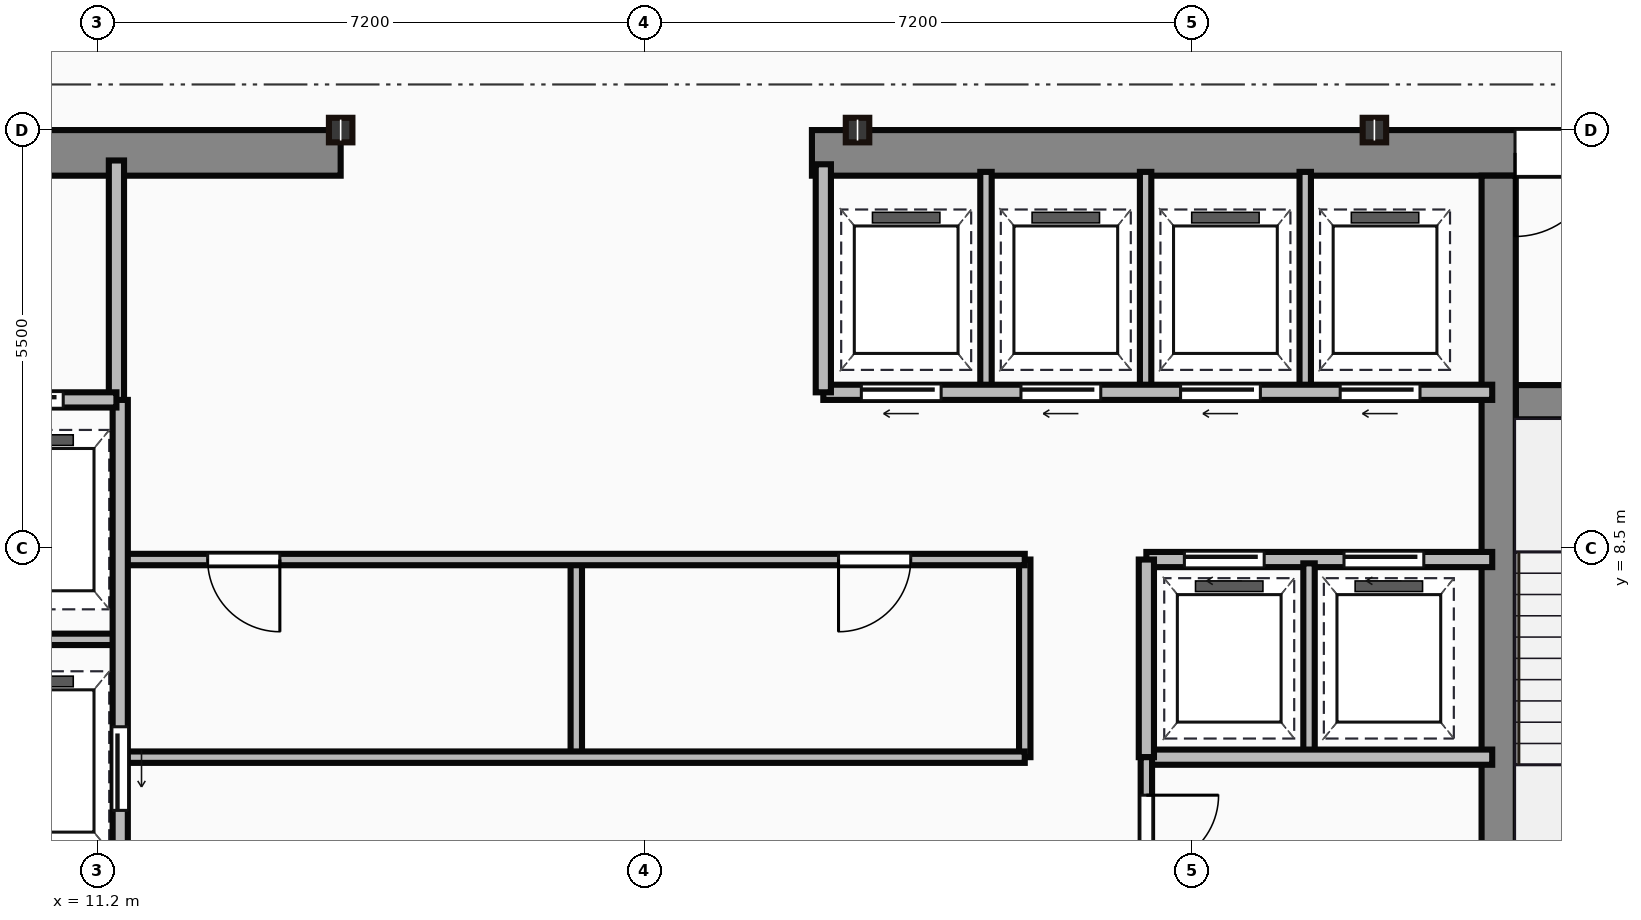
"""IFC4 building model, lengths in metres.
Left out: names, types, materials, properties, quantities, classifications, styles, units other than length and angle.
Written with IfcOpenShell. Run it as: python <this file> out.ifc"""

import sys

from ifc_helpers import new_model, si_unit, direction, frame, frame_2d, origin, origin_2d, place, context, subcontext, project, spatial, rectangle, i_section, extrude, source, transform, mapped, element, fill, save


model = new_model("IFC4")
c1 = context("Model", 3, precision=1e-05, world=origin(), true_north=direction((0.0, 1.0)))
c2 = subcontext(c1, "Body", "Model", "MODEL_VIEW")
j1 = project(units=[si_unit("LENGTHUNIT", "METRE"), si_unit("PLANEANGLEUNIT", "RADIAN")], contexts=[c1])
p1 = place(None, origin())
s1 = spatial("IfcSite", under=j1, at=p1, CompositionType="ELEMENT")
p2 = place(p1, origin())
s2 = spatial("IfcBuilding", under=s1, at=p2, CompositionType="ELEMENT")
p3 = place(p2, frame((0.0, 0.0, 280.7)))
s3 = spatial("IfcBuildingStorey", under=s2, at=p3, CompositionType="ELEMENT", Elevation=280.7)
m1 = source(origin(), c2, "Body", "SweptSolid", [
    extrude(rectangle(XDim=9.1, YDim=0.6, at=frame_2d((4.55, 0.0))), origin(), (0.0, 0.0, 1.0), 3.65),
])
p4 = place(p3, frame((5.3, 13.7, 0.0), z_axis=(0.0, 0.0, 1.0), x_axis=(1.0, 0.0, 0.0)))
e1 = element("IfcWall", 1, at=p4, inside=s3, PredefinedType="SHEAR", context=c2, shape_type="MappedRepresentation", body=[
    mapped(m1, transform((0.0, 0.0, 0.0))),
])
p5 = place(p4, frame((4.1, 0.0, 0.0)))
e2 = element("IfcOpeningElement", 2, at=p5, cuts=e1, PredefinedType="OPENING", context=c2, shape_type="SweptSolid", body=[
    extrude(rectangle(XDim=1.1, YDim=2.15, at=frame_2d((0.55, 1.075))), frame((0.0, 0.31, 0.0), z_axis=(0.0, -1.0, 0.0), x_axis=(1.0, 0.0, 0.0)), (0.0, 0.0, 1.0), 0.62),
])
m2 = source(origin(), c2, "Body", "SweptSolid", [
    extrude(rectangle(XDim=12.6, YDim=0.6, at=frame_2d((6.3, 0.0))), origin(), (0.0, 0.0, 1.0), 3.65),
])
p6 = place(p3, frame((20.6, 13.7, 0.0), z_axis=(0.0, 0.0, 1.0), x_axis=(1.0, 0.0, 0.0)))
e3 = element("IfcWall", 3, at=p6, inside=s3, PredefinedType="SHEAR", context=c2, shape_type="MappedRepresentation", body=[
    mapped(m2, transform((0.0, 0.0, 0.0))),
])
p7 = place(p6, frame((9.25, 0.0, 0.0)))
e4 = element("IfcOpeningElement", 4, at=p7, cuts=e3, PredefinedType="OPENING", context=c2, shape_type="SweptSolid", body=[
    extrude(rectangle(XDim=1.1, YDim=2.15, at=frame_2d((0.55, 1.075))), frame((0.0, 0.31, 0.0), z_axis=(0.0, -1.0, 0.0), x_axis=(1.0, 0.0, 0.0)), (0.0, 0.0, 1.0), 0.62),
])
m3 = source(origin(), c2, "Body", "SweptSolid", [
    extrude(rectangle(XDim=12.5, YDim=0.45, at=frame_2d((6.25, 0.0))), origin(), (0.0, 0.0, 1.0), 3.65),
])
p8 = place(p3, frame((29.635, 0.9, 0.0), z_axis=(0.0, 0.0, 1.0), x_axis=(0.0, 1.0, 0.0)))
e5 = element("IfcWall", 5, at=p8, inside=s3, PredefinedType="SHEAR", context=c2, shape_type="MappedRepresentation", body=[
    mapped(m3, transform((0.0, 0.0, 0.0))),
])
m4 = source(origin(), c2, "Body", "SweptSolid", [
    extrude(rectangle(XDim=3.39, YDim=0.45, at=frame_2d((1.695, 0.0))), origin(), (0.0, 0.0, 1.0), 3.65),
])
p9 = place(p3, frame((29.86, 10.42, 0.0), z_axis=(0.0, 0.0, 1.0), x_axis=(1.0, 0.0, 0.0)))
e6 = element("IfcWall", 6, at=p9, inside=s3, PredefinedType="SHEAR", context=c2, shape_type="MappedRepresentation", body=[
    mapped(m4, transform((0.0, 0.0, 0.0))),
])
p10 = place(p9, frame((1.1, 0.0, 0.0)))
e7 = element("IfcOpeningElement", 7, at=p10, cuts=e6, PredefinedType="OPENING", context=c2, shape_type="SweptSolid", body=[
    extrude(rectangle(XDim=1.1, YDim=2.15, at=frame_2d((0.55, 1.075))), frame((0.0, 0.235, 0.0), z_axis=(0.0, -1.0, 0.0), x_axis=(1.0, 0.0, 0.0)), (0.0, 0.0, 1.0), 0.47),
])
m5 = source(origin(), c2, "Body", "SweptSolid", [
    extrude(i_section(OverallWidth=0.309, OverallDepth=0.323, WebThickness=0.014, FlangeThickness=0.023, at=origin_2d()), origin(), (0.0, 0.0, 1.0), 3.65),
])
for number, where, z_axis, x_axis in (
    (8, (14.4, 14.0, 0.0), (0.0, 0.0, 1.0), (1.0, 0.0, 0.0)),
    (9, (21.2, 14.0, 0.0), (0.0, 0.0, 1.0), (1.0, 0.0, 0.0)),
    (10, (28.0, 14.0, 0.0), (0.0, 0.0, 1.0), (1.0, 0.0, 0.0)),
):
    element("IfcColumn", number, at=place(p3, frame(where, z_axis=z_axis, x_axis=x_axis)), inside=s3, PredefinedType="COLUMN", context=c2, shape_type="MappedRepresentation", body=[
        mapped(m5, transform((0.0, 0.0, 0.0))),
    ])
m6 = source(origin(), c2, "Body", "SweptSolid", [
    extrude(rectangle(XDim=3.18, YDim=0.2, at=frame_2d((1.59, 0.0))), origin(), (0.0, 0.0, 1.0), 3.4),
])
p11 = place(p3, frame((11.45, 10.42, 0.0), z_axis=(0.0, 0.0, 1.0), x_axis=(0.0, 1.0, 0.0)))
e11 = element("IfcWall", 11, at=p11, inside=s3, PredefinedType="PARTITIONING", context=c2, shape_type="MappedRepresentation", body=[
    mapped(m6, transform((0.0, 0.0, 0.0))),
])
m7 = source(origin(), c2, "Body", "SweptSolid", [
    extrude(rectangle(XDim=2.35, YDim=0.2, at=frame_2d((1.175, 0.0))), origin(), (0.0, 0.0, 1.0), 3.4),
])
p12 = place(p3, frame((9.1, 10.45, 0.0), z_axis=(0.0, 0.0, 1.0), x_axis=(1.0, 0.0, 0.0)))
e12 = element("IfcWall", 12, at=p12, inside=s3, PredefinedType="PARTITIONING", context=c2, shape_type="MappedRepresentation", body=[
    mapped(m7, transform((0.0, 0.0, 0.0))),
])
p13 = place(p12, frame((0.55, 0.0, 0.0)))
e13 = element("IfcOpeningElement", 13, at=p13, cuts=e12, PredefinedType="OPENING", context=c2, shape_type="SweptSolid", body=[
    extrude(rectangle(XDim=1.1, YDim=2.15, at=frame_2d((0.55, 1.075))), frame((0.0, 0.11, 0.0), z_axis=(0.0, -1.0, 0.0), x_axis=(1.0, 0.0, 0.0)), (0.0, 0.0, 1.0), 0.22),
])
m8 = source(origin(), c2, "Body", "SweptSolid", [
    extrude(rectangle(XDim=9.6, YDim=0.2, at=frame_2d((4.8, 0.0))), origin(), (0.0, 0.0, 1.0), 3.4),
])
p14 = place(p3, frame((11.5, 0.85, 0.0), z_axis=(0.0, 0.0, 1.0), x_axis=(0.0, 1.0, 0.0)))
e14 = element("IfcWall", 14, at=p14, inside=s3, PredefinedType="PARTITIONING", context=c2, shape_type="MappedRepresentation", body=[
    mapped(m8, transform((0.0, 0.0, 0.0))),
])
p15 = place(p14, frame((4.2, 0.0, 0.0)))
e15 = element("IfcOpeningElement", 15, at=p15, cuts=e14, PredefinedType="OPENING", context=c2, shape_type="SweptSolid", body=[
    extrude(rectangle(XDim=1.1, YDim=2.15, at=frame_2d((0.55, 1.075))), frame((0.0, 0.11, 0.0), z_axis=(0.0, -1.0, 0.0), x_axis=(1.0, 0.0, 0.0)), (0.0, 0.0, 1.0), 0.22),
])
p16 = place(p14, frame((0.9, 0.0, 0.0)))
e16 = element("IfcOpeningElement", 16, at=p16, cuts=e14, PredefinedType="OPENING", context=c2, shape_type="SweptSolid", body=[
    extrude(rectangle(XDim=1.2, YDim=2.15, at=frame_2d((0.6, 1.075))), frame((0.0, 0.11, 0.0), z_axis=(0.0, -1.0, 0.0), x_axis=(1.0, 0.0, 0.0)), (0.0, 0.0, 1.0), 0.22),
])
m9 = source(origin(), c2, "Body", "SweptSolid", [
    extrude(rectangle(XDim=2.4, YDim=0.15, at=frame_2d((1.2, 0.0))), origin(), (0.0, 0.0, 1.0), 3.4),
])
p17 = place(p3, frame((9.1, 7.3, 0.0), z_axis=(0.0, 0.0, 1.0), x_axis=(1.0, 0.0, 0.0)))
e17 = element("IfcWall", 17, at=p17, inside=s3, PredefinedType="PARTITIONING", context=c2, shape_type="MappedRepresentation", body=[
    mapped(m9, transform((0.0, 0.0, 0.0))),
])
m10 = source(origin(), c2, "Body", "SweptSolid", [
    extrude(rectangle(XDim=11.85, YDim=0.15, at=frame_2d((5.925, 0.0))), origin(), (0.0, 0.0, 1.0), 3.4),
])
p18 = place(p3, frame((11.55, 5.75, 0.0), z_axis=(0.0, 0.0, 1.0), x_axis=(1.0, 0.0, 0.0)))
e18 = element("IfcWall", 18, at=p18, inside=s3, PredefinedType="PARTITIONING", context=c2, shape_type="MappedRepresentation", body=[
    mapped(m10, transform((0.0, 0.0, 0.0))),
])
p19 = place(p3, frame((11.55, 8.35, 0.0), z_axis=(0.0, 0.0, 1.0), x_axis=(1.0, 0.0, 0.0)))
e19 = element("IfcWall", 19, at=p19, inside=s3, PredefinedType="PARTITIONING", context=c2, shape_type="MappedRepresentation", body=[
    mapped(m10, transform((0.0, 0.0, 0.0))),
])
p20 = place(p19, frame((1.1, 0.0, 0.0)))
e20 = element("IfcOpeningElement", 20, at=p20, cuts=e19, PredefinedType="OPENING", context=c2, shape_type="SweptSolid", body=[
    extrude(rectangle(XDim=0.95, YDim=2.15, at=frame_2d((0.475, 1.075))), frame((0.0, 0.085, 0.0), z_axis=(0.0, -1.0, 0.0), x_axis=(1.0, 0.0, 0.0)), (0.0, 0.0, 1.0), 0.17),
])
p21 = place(p19, frame((9.4, 0.0, 0.0)))
e21 = element("IfcOpeningElement", 21, at=p21, cuts=e19, PredefinedType="OPENING", context=c2, shape_type="SweptSolid", body=[
    extrude(rectangle(XDim=0.95, YDim=2.15, at=frame_2d((0.475, 1.075))), frame((0.0, 0.085, 0.0), z_axis=(0.0, -1.0, 0.0), x_axis=(1.0, 0.0, 0.0)), (0.0, 0.0, 1.0), 0.17),
])
m11 = source(origin(), c2, "Body", "SweptSolid", [
    extrude(rectangle(XDim=2.6, YDim=0.15, at=frame_2d((1.3, 0.0))), origin(), (0.0, 0.0, 1.0), 3.4),
])
p22 = place(p3, frame((23.4, 5.75, 0.0), z_axis=(0.0, 0.0, 1.0), x_axis=(0.0, 1.0, 0.0)))
e22 = element("IfcWall", 22, at=p22, inside=s3, PredefinedType="PARTITIONING", context=c2, shape_type="MappedRepresentation", body=[
    mapped(m11, transform((0.0, 0.0, 0.0))),
])
m12 = source(origin(), c2, "Body", "SweptSolid", [
    extrude(rectangle(XDim=2.5, YDim=0.15, at=frame_2d((1.25, 0.0))), origin(), (0.0, 0.0, 1.0), 3.4),
])
p23 = place(p3, frame((17.5, 5.8, 0.0), z_axis=(0.0, 0.0, 1.0), x_axis=(0.0, 1.0, 0.0)))
e23 = element("IfcWall", 23, at=p23, inside=s3, PredefinedType="PARTITIONING", context=c2, shape_type="MappedRepresentation", body=[
    mapped(m12, transform((0.0, 0.0, 0.0))),
])
m13 = source(origin(), c2, "Body", "SweptSolid", [
    extrude(rectangle(XDim=8.8, YDim=0.2, at=frame_2d((4.4, 0.0))), origin(), (0.0, 0.0, 1.0), 3.4),
])
p24 = place(p3, frame((20.75, 10.55, 0.0), z_axis=(0.0, 0.0, 1.0), x_axis=(1.0, 0.0, 0.0)))
e24 = element("IfcWall", 24, at=p24, inside=s3, PredefinedType="PARTITIONING", context=c2, shape_type="MappedRepresentation", body=[
    mapped(m13, transform((0.0, 0.0, 0.0))),
])
p25 = place(p24, frame((0.5, 0.0, 0.0)))
e25 = element("IfcOpeningElement", 25, at=p25, cuts=e24, PredefinedType="OPENING", context=c2, shape_type="SweptSolid", body=[
    extrude(rectangle(XDim=1.05, YDim=2.15, at=frame_2d((0.525, 1.075))), frame((0.0, 0.11, 0.0), z_axis=(0.0, -1.0, 0.0), x_axis=(1.0, 0.0, 0.0)), (0.0, 0.0, 1.0), 0.22),
])
p26 = place(p24, frame((2.6, 0.0, 0.0)))
e26 = element("IfcOpeningElement", 26, at=p26, cuts=e24, PredefinedType="OPENING", context=c2, shape_type="SweptSolid", body=[
    extrude(rectangle(XDim=1.05, YDim=2.15, at=frame_2d((0.525, 1.075))), frame((0.0, 0.11, 0.0), z_axis=(0.0, -1.0, 0.0), x_axis=(1.0, 0.0, 0.0)), (0.0, 0.0, 1.0), 0.22),
])
p27 = place(p24, frame((4.7, 0.0, 0.0)))
e27 = element("IfcOpeningElement", 27, at=p27, cuts=e24, PredefinedType="OPENING", context=c2, shape_type="SweptSolid", body=[
    extrude(rectangle(XDim=1.05, YDim=2.15, at=frame_2d((0.525, 1.075))), frame((0.0, 0.11, 0.0), z_axis=(0.0, -1.0, 0.0), x_axis=(1.0, 0.0, 0.0)), (0.0, 0.0, 1.0), 0.22),
])
p28 = place(p24, frame((6.8, 0.0, 0.0)))
e28 = element("IfcOpeningElement", 28, at=p28, cuts=e24, PredefinedType="OPENING", context=c2, shape_type="SweptSolid", body=[
    extrude(rectangle(XDim=1.05, YDim=2.15, at=frame_2d((0.525, 1.075))), frame((0.0, 0.11, 0.0), z_axis=(0.0, -1.0, 0.0), x_axis=(1.0, 0.0, 0.0)), (0.0, 0.0, 1.0), 0.22),
])
m14 = source(origin(), c2, "Body", "SweptSolid", [
    extrude(rectangle(XDim=3.0, YDim=0.2, at=frame_2d((1.5, 0.0))), origin(), (0.0, 0.0, 1.0), 3.4),
])
p29 = place(p3, frame((20.75, 10.55, 0.0), z_axis=(0.0, 0.0, 1.0), x_axis=(0.0, 1.0, 0.0)))
e29 = element("IfcWall", 29, at=p29, inside=s3, PredefinedType="PARTITIONING", context=c2, shape_type="MappedRepresentation", body=[
    mapped(m14, transform((0.0, 0.0, 0.0))),
])
m15 = source(origin(), c2, "Body", "SweptSolid", [
    extrude(rectangle(XDim=2.85, YDim=0.15, at=frame_2d((1.425, 0.0))), origin(), (0.0, 0.0, 1.0), 3.4),
])
for number, where, z_axis, x_axis in (
    (30, (22.89, 10.6, 0.0), (0.0, 0.0, 1.0), (0.0, 1.0, 0.0)),
    (31, (24.99, 10.6, 0.0), (0.0, 0.0, 1.0), (0.0, 1.0, 0.0)),
    (32, (27.09, 10.6, 0.0), (0.0, 0.0, 1.0), (0.0, 1.0, 0.0)),
):
    element("IfcWall", number, at=place(p3, frame(where, z_axis=z_axis, x_axis=x_axis)), inside=s3, PredefinedType="PARTITIONING", context=c2, shape_type="MappedRepresentation", body=[
        mapped(m15, transform((0.0, 0.0, 0.0))),
    ])
m16 = source(origin(), c2, "Body", "SweptSolid", [
    extrude(rectangle(XDim=4.55, YDim=0.2, at=frame_2d((2.275, 0.0))), origin(), (0.0, 0.0, 1.0), 3.4),
])
p30 = place(p3, frame((25.0, 8.35, 0.0), z_axis=(0.0, 0.0, 1.0), x_axis=(1.0, 0.0, 0.0)))
e33 = element("IfcWall", 33, at=p30, inside=s3, PredefinedType="PARTITIONING", context=c2, shape_type="MappedRepresentation", body=[
    mapped(m16, transform((0.0, 0.0, 0.0))),
])
p31 = place(p30, frame((0.5, 0.0, 0.0)))
e34 = element("IfcOpeningElement", 34, at=p31, cuts=e33, PredefinedType="OPENING", context=c2, shape_type="SweptSolid", body=[
    extrude(rectangle(XDim=1.05, YDim=2.15, at=frame_2d((0.525, 1.075))), frame((0.0, 0.11, 0.0), z_axis=(0.0, -1.0, 0.0), x_axis=(1.0, 0.0, 0.0)), (0.0, 0.0, 1.0), 0.22),
])
p32 = place(p30, frame((2.6, 0.0, 0.0)))
e35 = element("IfcOpeningElement", 35, at=p32, cuts=e33, PredefinedType="OPENING", context=c2, shape_type="SweptSolid", body=[
    extrude(rectangle(XDim=1.05, YDim=2.15, at=frame_2d((0.525, 1.075))), frame((0.0, 0.11, 0.0), z_axis=(0.0, -1.0, 0.0), x_axis=(1.0, 0.0, 0.0)), (0.0, 0.0, 1.0), 0.22),
])
p33 = place(p3, frame((25.0, 5.75, 0.0), z_axis=(0.0, 0.0, 1.0), x_axis=(1.0, 0.0, 0.0)))
e36 = element("IfcWall", 36, at=p33, inside=s3, PredefinedType="PARTITIONING", context=c2, shape_type="MappedRepresentation", body=[
    mapped(m16, transform((0.0, 0.0, 0.0))),
])
m17 = source(origin(), c2, "Body", "SweptSolid", [
    extrude(rectangle(XDim=2.6, YDim=0.2, at=frame_2d((1.3, 0.0))), origin(), (0.0, 0.0, 1.0), 3.4),
])
p34 = place(p3, frame((25.0, 5.75, 0.0), z_axis=(0.0, 0.0, 1.0), x_axis=(0.0, 1.0, 0.0)))
e37 = element("IfcWall", 37, at=p34, inside=s3, PredefinedType="PARTITIONING", context=c2, shape_type="MappedRepresentation", body=[
    mapped(m17, transform((0.0, 0.0, 0.0))),
])
p35 = place(p3, frame((27.14, 5.8, 0.0), z_axis=(0.0, 0.0, 1.0), x_axis=(0.0, 1.0, 0.0)))
e38 = element("IfcWall", 38, at=p35, inside=s3, PredefinedType="PARTITIONING", context=c2, shape_type="MappedRepresentation", body=[
    mapped(m12, transform((0.0, 0.0, 0.0))),
])
m18 = source(origin(), c2, "Body", "SweptSolid", [
    extrude(rectangle(XDim=4.9, YDim=0.15, at=frame_2d((2.45, 0.0))), origin(), (0.0, 0.0, 1.0), 3.4),
])
p36 = place(p3, frame((25.0, 0.85, 0.0), z_axis=(0.0, 0.0, 1.0), x_axis=(0.0, 1.0, 0.0)))
e39 = element("IfcWall", 39, at=p36, inside=s3, PredefinedType="PARTITIONING", context=c2, shape_type="MappedRepresentation", body=[
    mapped(m18, transform((0.0, 0.0, 0.0))),
])
p37 = place(p36, frame((1.8, 0.0, 0.0)))
e40 = element("IfcOpeningElement", 40, at=p37, cuts=e39, PredefinedType="OPENING", context=c2, shape_type="SweptSolid", body=[
    extrude(rectangle(XDim=0.95, YDim=2.15, at=frame_2d((0.475, 1.075))), frame((0.0, 0.085, 0.0), z_axis=(0.0, -1.0, 0.0), x_axis=(1.0, 0.0, 0.0)), (0.0, 0.0, 1.0), 0.17),
])
p38 = place(p36, frame((3.45, 0.0, 0.0)))
e41 = element("IfcOpeningElement", 41, at=p38, cuts=e39, PredefinedType="OPENING", context=c2, shape_type="SweptSolid", body=[
    extrude(rectangle(XDim=0.95, YDim=2.15, at=frame_2d((0.475, 1.075))), frame((0.0, 0.085, 0.0), z_axis=(0.0, -1.0, 0.0), x_axis=(1.0, 0.0, 0.0)), (0.0, 0.0, 1.0), 0.17),
])
m19 = source(origin(), c2, "Body", "SweptSolid", [
    extrude(rectangle(XDim=1.1, YDim=2.15, at=frame_2d((0.55, 1.075))), frame((0.0, 0.025, 0.0), z_axis=(0.0, -1.0, 0.0), x_axis=(1.0, 0.0, 0.0)), (0.0, 0.0, 1.0), 0.05),
])
p39 = place(p7, origin())
e42 = element("IfcDoor", 42, at=p39, inside=s3, OperationType="SINGLE_SWING_LEFT", PredefinedType="DOOR", context=c2, shape_type="MappedRepresentation", body=[
    mapped(m19, transform((0.0, 0.0, 0.0))),
])
fill(e4, e42)
p40 = place(p13, origin())
e43 = element("IfcDoor", 43, at=p40, inside=s3, OperationType="SLIDING_TO_LEFT", PredefinedType="DOOR", context=c2, shape_type="MappedRepresentation", body=[
    mapped(m19, transform((0.0, 0.0, 0.0))),
])
fill(e13, e43)
p41 = place(p15, frame((1.1, 0.0, 0.0), z_axis=(0.0, 0.0, 1.0), x_axis=(-1.0, 0.0, 0.0)))
e44 = element("IfcDoor", 44, at=p41, inside=s3, OperationType="SLIDING_TO_LEFT", PredefinedType="DOOR", context=c2, shape_type="MappedRepresentation", body=[
    mapped(m19, transform((0.0, 0.0, 0.0))),
])
fill(e15, e44)
m20 = source(origin(), c2, "Body", "SweptSolid", [
    extrude(rectangle(XDim=0.95, YDim=2.15, at=frame_2d((0.475, 1.075))), frame((0.0, 0.025, 0.0), z_axis=(0.0, -1.0, 0.0), x_axis=(1.0, 0.0, 0.0)), (0.0, 0.0, 1.0), 0.05),
])
p42 = place(p20, origin())
e45 = element("IfcDoor", 45, at=p42, inside=s3, OperationType="SINGLE_SWING_RIGHT", PredefinedType="DOOR", context=c2, shape_type="MappedRepresentation", body=[
    mapped(m20, transform((0.0, 0.0, 0.0))),
])
fill(e20, e45)
p43 = place(p21, origin())
e46 = element("IfcDoor", 46, at=p43, inside=s3, OperationType="SINGLE_SWING_LEFT", PredefinedType="DOOR", context=c2, shape_type="MappedRepresentation", body=[
    mapped(m20, transform((0.0, 0.0, 0.0))),
])
fill(e21, e46)
m21 = source(origin(), c2, "Body", "SweptSolid", [
    extrude(rectangle(XDim=1.05, YDim=2.15, at=frame_2d((0.525, 1.075))), frame((0.0, 0.025, 0.0), z_axis=(0.0, -1.0, 0.0), x_axis=(1.0, 0.0, 0.0)), (0.0, 0.0, 1.0), 0.05),
])
p44 = place(p25, frame((1.05, 0.0, 0.0), z_axis=(0.0, 0.0, 1.0), x_axis=(-1.0, 0.0, 0.0)))
e47 = element("IfcDoor", 47, at=p44, inside=s3, OperationType="SLIDING_TO_LEFT", PredefinedType="DOOR", context=c2, shape_type="MappedRepresentation", body=[
    mapped(m21, transform((0.0, 0.0, 0.0))),
])
fill(e25, e47)
p45 = place(p26, frame((1.05, 0.0, 0.0), z_axis=(0.0, 0.0, 1.0), x_axis=(-1.0, 0.0, 0.0)))
e48 = element("IfcDoor", 48, at=p45, inside=s3, OperationType="SLIDING_TO_LEFT", PredefinedType="DOOR", context=c2, shape_type="MappedRepresentation", body=[
    mapped(m21, transform((0.0, 0.0, 0.0))),
])
fill(e26, e48)
p46 = place(p27, frame((1.05, 0.0, 0.0), z_axis=(0.0, 0.0, 1.0), x_axis=(-1.0, 0.0, 0.0)))
e49 = element("IfcDoor", 49, at=p46, inside=s3, OperationType="SLIDING_TO_LEFT", PredefinedType="DOOR", context=c2, shape_type="MappedRepresentation", body=[
    mapped(m21, transform((0.0, 0.0, 0.0))),
])
fill(e27, e49)
p47 = place(p28, frame((1.05, 0.0, 0.0), z_axis=(0.0, 0.0, 1.0), x_axis=(-1.0, 0.0, 0.0)))
e50 = element("IfcDoor", 50, at=p47, inside=s3, OperationType="SLIDING_TO_LEFT", PredefinedType="DOOR", context=c2, shape_type="MappedRepresentation", body=[
    mapped(m21, transform((0.0, 0.0, 0.0))),
])
fill(e28, e50)
p48 = place(p31, origin())
e51 = element("IfcDoor", 51, at=p48, inside=s3, OperationType="SLIDING_TO_LEFT", PredefinedType="DOOR", context=c2, shape_type="MappedRepresentation", body=[
    mapped(m21, transform((0.0, 0.0, 0.0))),
])
fill(e34, e51)
p49 = place(p32, origin())
e52 = element("IfcDoor", 52, at=p49, inside=s3, OperationType="SLIDING_TO_LEFT", PredefinedType="DOOR", context=c2, shape_type="MappedRepresentation", body=[
    mapped(m21, transform((0.0, 0.0, 0.0))),
])
fill(e35, e52)
p50 = place(p38, origin())
e53 = element("IfcDoor", 53, at=p50, inside=s3, OperationType="SINGLE_SWING_RIGHT", PredefinedType="DOOR", context=c2, shape_type="MappedRepresentation", body=[
    mapped(m20, transform((0.0, 0.0, 0.0))),
])
fill(e41, e53)
save(model, sys.argv[1])
